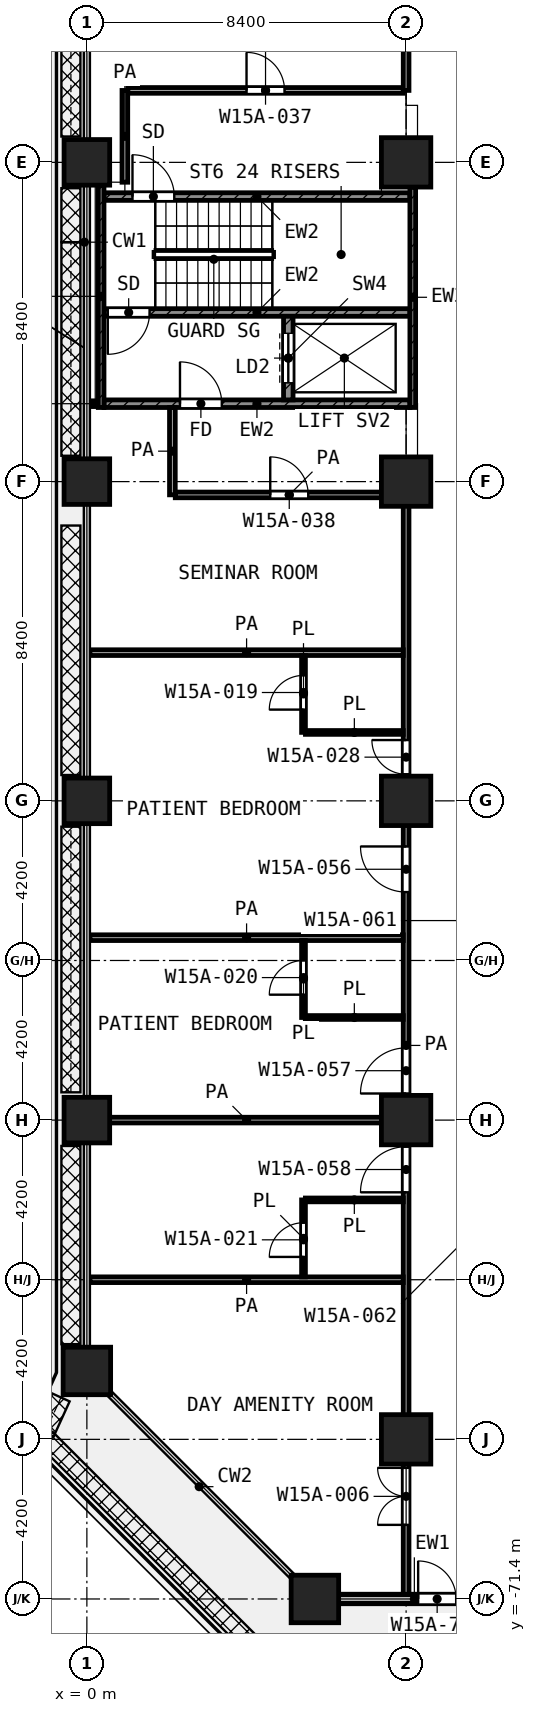
"""IFC4 building model, lengths in metres.
Left out: names, types, materials, properties, quantities, classifications, styles, units other than length and angle.
Written with IfcOpenShell. Run it as: python <this file> out.ifc"""

import sys

from ifc_helpers import new_model, si_unit, direction, frame, frame_2d, origin, origin_2d, place, context, subcontext, project, spatial, rectangle, extrude, element, fill, save


model = new_model("IFC4")
c1 = context("Model", 3, precision=1e-05, world=origin(), true_north=direction((0.0, 1.0)))
c2 = subcontext(c1, "Body", "Model", "MODEL_VIEW")
j1 = project(units=[si_unit("LENGTHUNIT", "METRE"), si_unit("PLANEANGLEUNIT", "RADIAN")], contexts=[c1])
p1 = place(None, origin())
s1 = spatial("IfcSite", under=j1, at=p1, CompositionType="ELEMENT")
p2 = place(p1, origin())
s2 = spatial("IfcBuilding", under=s1, at=p2, CompositionType="ELEMENT")
p3 = place(p2, frame((0.0, 0.0, 68.6)))
s3 = spatial("IfcBuildingStorey", under=s2, at=p3, CompositionType="ELEMENT", Elevation=68.6)
p4 = place(p3, frame((0.0, -33.6, 0.0), z_axis=(0.0, 0.0, 1.0), x_axis=(1.0, 0.0, 0.0)))
e1 = element("IfcColumn", 1, at=p4, inside=s3, PredefinedType="COLUMN", context=c2, shape_type="SweptSolid", body=[
    extrude(rectangle(XDim=1.2, YDim=1.2, at=origin_2d()), origin(), (0.0, 0.0, 1.0), 4.2),
])
p5 = place(p3, frame((8.4, -33.6, 0.0), z_axis=(0.0, 0.0, 1.0), x_axis=(1.0, 0.0, 0.0)))
e2 = element("IfcColumn", 2, at=p5, inside=s3, PredefinedType="COLUMN", context=c2, shape_type="SweptSolid", body=[
    extrude(rectangle(XDim=1.3, YDim=1.3, at=origin_2d()), origin(), (0.0, 0.0, 1.0), 4.2),
])
p6 = place(p3, frame((0.0, -42.0, 0.0), z_axis=(0.0, 0.0, 1.0), x_axis=(1.0, 0.0, 0.0)))
e3 = element("IfcColumn", 3, at=p6, inside=s3, PredefinedType="COLUMN", context=c2, shape_type="SweptSolid", body=[
    extrude(rectangle(XDim=1.2, YDim=1.2, at=origin_2d()), origin(), (0.0, 0.0, 1.0), 4.2),
])
p7 = place(p3, frame((8.4, -42.0, 0.0), z_axis=(0.0, 0.0, 1.0), x_axis=(1.0, 0.0, 0.0)))
e4 = element("IfcColumn", 4, at=p7, inside=s3, PredefinedType="COLUMN", context=c2, shape_type="SweptSolid", body=[
    extrude(rectangle(XDim=1.3, YDim=1.3, at=origin_2d()), origin(), (0.0, 0.0, 1.0), 4.2),
])
p8 = place(p3, frame((0.0, -50.4, 0.0), z_axis=(0.0, 0.0, 1.0), x_axis=(1.0, 0.0, 0.0)))
e5 = element("IfcColumn", 5, at=p8, inside=s3, PredefinedType="COLUMN", context=c2, shape_type="SweptSolid", body=[
    extrude(rectangle(XDim=1.2, YDim=1.2, at=origin_2d()), origin(), (0.0, 0.0, 1.0), 4.2),
])
p9 = place(p3, frame((8.4, -50.4, 0.0), z_axis=(0.0, 0.0, 1.0), x_axis=(1.0, 0.0, 0.0)))
e6 = element("IfcColumn", 6, at=p9, inside=s3, PredefinedType="COLUMN", context=c2, shape_type="SweptSolid", body=[
    extrude(rectangle(XDim=1.3, YDim=1.3, at=origin_2d()), origin(), (0.0, 0.0, 1.0), 4.2),
])
p10 = place(p3, frame((0.0, -58.8, 0.0), z_axis=(0.0, 0.0, 1.0), x_axis=(1.0, 0.0, 0.0)))
e7 = element("IfcColumn", 7, at=p10, inside=s3, PredefinedType="COLUMN", context=c2, shape_type="SweptSolid", body=[
    extrude(rectangle(XDim=1.2, YDim=1.2, at=origin_2d()), origin(), (0.0, 0.0, 1.0), 4.2),
])
p11 = place(p3, frame((8.4, -58.8, 0.0), z_axis=(0.0, 0.0, 1.0), x_axis=(1.0, 0.0, 0.0)))
e8 = element("IfcColumn", 8, at=p11, inside=s3, PredefinedType="COLUMN", context=c2, shape_type="SweptSolid", body=[
    extrude(rectangle(XDim=1.3, YDim=1.3, at=origin_2d()), origin(), (0.0, 0.0, 1.0), 4.2),
])
p12 = place(p3, frame((0.0, -65.4, 0.0), z_axis=(0.0, 0.0, 1.0), x_axis=(1.0, 0.0, 0.0)))
e9 = element("IfcColumn", 9, at=p12, inside=s3, PredefinedType="COLUMN", context=c2, shape_type="SweptSolid", body=[
    extrude(rectangle(XDim=1.25, YDim=1.25, at=origin_2d()), origin(), (0.0, 0.0, 1.0), 4.2),
])
p13 = place(p3, frame((8.4, -67.2, 0.0), z_axis=(0.0, 0.0, 1.0), x_axis=(1.0, 0.0, 0.0)))
e10 = element("IfcColumn", 10, at=p13, inside=s3, PredefinedType="COLUMN", context=c2, shape_type="SweptSolid", body=[
    extrude(rectangle(XDim=1.3, YDim=1.3, at=origin_2d()), origin(), (0.0, 0.0, 1.0), 4.2),
])
p14 = place(p3, frame((6.0, -71.4, 0.0), z_axis=(0.0, 0.0, 1.0), x_axis=(1.0, 0.0, 0.0)))
e11 = element("IfcColumn", 11, at=p14, inside=s3, PredefinedType="COLUMN", context=c2, shape_type="SweptSolid", body=[
    extrude(rectangle(XDim=1.25, YDim=1.25, at=origin_2d()), origin(), (0.0, 0.0, 1.0), 4.2),
])
p15 = place(p3, frame((6.625, -71.4, 0.0), z_axis=(0.0, 0.0, 1.0), x_axis=(1.0, 0.0, 0.0)))
e12 = element("IfcWall", 12, at=p15, inside=s3, PredefinedType="SOLIDWALL", context=c2, shape_type="SweptSolid", body=[
    extrude(rectangle(XDim=3.983, YDim=0.25, at=frame_2d((1.992, 0.0))), origin(), (0.0, 0.0, 1.0), 3.78),
])
p16 = place(p15, frame((2.092, 0.0, 0.0)))
e13 = element("IfcOpeningElement", 13, at=p16, cuts=e12, PredefinedType="OPENING", context=c2, shape_type="SweptSolid", body=[
    extrude(rectangle(XDim=1.0, YDim=2.1, at=frame_2d((0.5, 1.05))), frame((0.0, 0.135, 0.0), z_axis=(0.0, -1.0, 0.0), x_axis=(1.0, 0.0, 0.0)), (0.0, 0.0, 1.0), 0.27),
])
p17 = place(p3, frame((0.375, -40.05, 0.0), z_axis=(0.0, 0.0, 1.0), x_axis=(0.0, 1.0, 0.0)))
e14 = element("IfcWall", 14, at=p17, inside=s3, PredefinedType="SHEAR", context=c2, shape_type="SweptSolid", body=[
    extrude(rectangle(XDim=5.85, YDim=0.15, at=frame_2d((2.925, 0.0))), origin(), (0.0, 0.0, 1.0), 3.9),
])
p18 = place(p3, frame((8.575, -40.05, 0.0), z_axis=(0.0, 0.0, 1.0), x_axis=(0.0, 1.0, 0.0)))
e15 = element("IfcWall", 15, at=p18, inside=s3, PredefinedType="SHEAR", context=c2, shape_type="SweptSolid", body=[
    extrude(rectangle(XDim=5.8, YDim=0.15, at=frame_2d((2.9, 0.0))), origin(), (0.0, 0.0, 1.0), 3.9),
])
p19 = place(p3, frame((0.45, -34.5, 0.0), z_axis=(0.0, 0.0, 1.0), x_axis=(1.0, 0.0, 0.0)))
e16 = element("IfcWall", 16, at=p19, inside=s3, PredefinedType="SHEAR", context=c2, shape_type="SweptSolid", body=[
    extrude(rectangle(XDim=8.05, YDim=0.2, at=frame_2d((4.025, 0.0))), origin(), (0.0, 0.0, 1.0), 3.9),
])
p20 = place(p19, frame((0.75, 0.0, 0.0)))
e17 = element("IfcOpeningElement", 17, at=p20, cuts=e16, PredefinedType="OPENING", context=c2, shape_type="SweptSolid", body=[
    extrude(rectangle(XDim=1.1, YDim=2.1, at=frame_2d((0.55, 1.05))), frame((0.0, 0.11, 0.0), z_axis=(0.0, -1.0, 0.0), x_axis=(1.0, 0.0, 0.0)), (0.0, 0.0, 1.0), 0.22),
])
p21 = place(p3, frame((0.45, -37.55, 0.0), z_axis=(0.0, 0.0, 1.0), x_axis=(1.0, 0.0, 0.0)))
e18 = element("IfcWall", 18, at=p21, inside=s3, PredefinedType="SHEAR", context=c2, shape_type="SweptSolid", body=[
    extrude(rectangle(XDim=8.05, YDim=0.2, at=frame_2d((4.025, 0.0))), origin(), (0.0, 0.0, 1.0), 3.9),
])
p22 = place(p21, frame((0.1, 0.0, 0.0)))
e19 = element("IfcOpeningElement", 19, at=p22, cuts=e18, PredefinedType="OPENING", context=c2, shape_type="SweptSolid", body=[
    extrude(rectangle(XDim=1.1, YDim=2.1, at=frame_2d((0.55, 1.05))), frame((0.0, 0.11, 0.0), z_axis=(0.0, -1.0, 0.0), x_axis=(1.0, 0.0, 0.0)), (0.0, 0.0, 1.0), 0.22),
])
p23 = place(p3, frame((0.45, -39.95, 0.0), z_axis=(0.0, 0.0, 1.0), x_axis=(1.0, 0.0, 0.0)))
e20 = element("IfcWall", 20, at=p23, inside=s3, PredefinedType="SHEAR", context=c2, shape_type="SweptSolid", body=[
    extrude(rectangle(XDim=8.05, YDim=0.2, at=frame_2d((4.025, 0.0))), origin(), (0.0, 0.0, 1.0), 3.9),
])
p24 = place(p23, frame((2.0, 0.0, 0.0)))
e21 = element("IfcOpeningElement", 21, at=p24, cuts=e20, PredefinedType="OPENING", context=c2, shape_type="SweptSolid", body=[
    extrude(rectangle(XDim=1.1, YDim=2.1, at=frame_2d((0.55, 1.05))), frame((0.0, 0.11, 0.0), z_axis=(0.0, -1.0, 0.0), x_axis=(1.0, 0.0, 0.0)), (0.0, 0.0, 1.0), 0.22),
])
p25 = place(p3, frame((5.3, -39.85, 0.0), z_axis=(0.0, 0.0, 1.0), x_axis=(0.0, 1.0, 0.0)))
e22 = element("IfcWall", 22, at=p25, inside=s3, PredefinedType="SHEAR", context=c2, shape_type="SweptSolid", body=[
    extrude(rectangle(XDim=2.2, YDim=0.25, at=frame_2d((1.1, 0.0))), origin(), (0.0, 0.0, 1.0), 3.9),
])
p26 = place(p25, frame((0.45, 0.0, 0.0)))
e23 = element("IfcOpeningElement", 23, at=p26, cuts=e22, PredefinedType="OPENING", context=c2, shape_type="SweptSolid", body=[
    extrude(rectangle(XDim=1.3, YDim=2.1, at=frame_2d((0.65, 1.05))), frame((0.0, 0.135, 0.0), z_axis=(0.0, -1.0, 0.0), x_axis=(1.0, 0.0, 0.0)), (0.0, 0.0, 1.0), 0.27),
])
for number, where, z_axis, x_axis in (
    (24, (5.75, -60.9, 0.0), (0.0, 0.0, 1.0), (1.0, 0.0, 0.0)),
    (25, (5.75, -56.1, 0.0), (0.0, 0.0, 1.0), (1.0, 0.0, 0.0)),
):
    element("IfcWall", number, at=place(p3, frame(where, z_axis=z_axis, x_axis=x_axis)), inside=s3, PredefinedType="PARTITIONING", context=c2, shape_type="SweptSolid", body=[
        extrude(rectangle(XDim=2.575, YDim=0.1, at=frame_2d((1.288, 0.0))), origin(), (0.0, 0.0, 1.0), 3.9),
    ])
p27 = place(p3, frame((5.751, -48.6, 0.0), z_axis=(0.0, 0.0, 1.0), x_axis=(1.0, 0.0, 0.0)))
e26 = element("IfcWall", 26, at=p27, inside=s3, PredefinedType="PARTITIONING", context=c2, shape_type="SweptSolid", body=[
    extrude(rectangle(XDim=2.574, YDim=0.1, at=frame_2d((1.287, 0.0))), origin(), (0.0, 0.0, 1.0), 3.9),
])
p28 = place(p3, frame((5.7, -62.925, 0.0), z_axis=(0.0, 0.0, 1.0), x_axis=(0.0, 1.0, 0.0)))
e27 = element("IfcWall", 27, at=p28, inside=s3, PredefinedType="PARTITIONING", context=c2, shape_type="SweptSolid", body=[
    extrude(rectangle(XDim=2.025, YDim=0.1, at=frame_2d((1.013, 0.0))), origin(), (0.0, 0.0, 1.0), 3.9),
])
p29 = place(p28, frame((0.525, 0.0, 0.0)))
e28 = element("IfcOpeningElement", 28, at=p29, cuts=e27, PredefinedType="OPENING", context=c2, shape_type="SweptSolid", body=[
    extrude(rectangle(XDim=0.9, YDim=2.1, at=frame_2d((0.45, 1.05))), frame((0.0, 0.06, 0.0), z_axis=(0.0, -1.0, 0.0), x_axis=(1.0, 0.0, 0.0)), (0.0, 0.0, 1.0), 0.12),
])
p30 = place(p3, frame((5.7, -56.1, 0.0), z_axis=(0.0, 0.0, 1.0), x_axis=(0.0, 1.0, 0.0)))
e29 = element("IfcWall", 29, at=p30, inside=s3, PredefinedType="PARTITIONING", context=c2, shape_type="SweptSolid", body=[
    extrude(rectangle(XDim=2.025, YDim=0.1, at=frame_2d((1.013, 0.0))), origin(), (0.0, 0.0, 1.0), 3.9),
])
p31 = place(p30, frame((0.6, 0.0, 0.0)))
e30 = element("IfcOpeningElement", 30, at=p31, cuts=e29, PredefinedType="OPENING", context=c2, shape_type="SweptSolid", body=[
    extrude(rectangle(XDim=0.9, YDim=2.1, at=frame_2d((0.45, 1.05))), frame((0.0, 0.06, 0.0), z_axis=(0.0, -1.0, 0.0), x_axis=(1.0, 0.0, 0.0)), (0.0, 0.0, 1.0), 0.12),
])
p32 = place(p3, frame((5.7, -48.598, 0.0), z_axis=(0.0, 0.0, 1.0), x_axis=(0.0, 1.0, 0.0)))
e31 = element("IfcWall", 31, at=p32, inside=s3, PredefinedType="PARTITIONING", context=c2, shape_type="SweptSolid", body=[
    extrude(rectangle(XDim=2.023, YDim=0.1, at=frame_2d((1.011, 0.0))), origin(), (0.0, 0.0, 1.0), 3.9),
])
p33 = place(p32, frame((0.599, 0.0, 0.0)))
e32 = element("IfcOpeningElement", 32, at=p33, cuts=e31, PredefinedType="OPENING", context=c2, shape_type="SweptSolid", body=[
    extrude(rectangle(XDim=0.9, YDim=2.1, at=frame_2d((0.45, 1.05))), frame((0.0, 0.06, 0.0), z_axis=(0.0, -1.0, 0.0), x_axis=(1.0, 0.0, 0.0)), (0.0, 0.0, 1.0), 0.12),
])
for number, where, z_axis, x_axis in (
    (33, (0.08, -63.0, 0.0), (0.0, 0.0, 1.0), (1.0, 0.0, 0.0)),
    (34, (0.08, -58.8, 0.0), (0.0, 0.0, 1.0), (1.0, 0.0, 0.0)),
    (35, (0.08, -54.0, 0.0), (0.0, 0.0, 1.0), (1.0, 0.0, 0.0)),
    (36, (0.08, -46.5, 0.0), (0.0, 0.0, 1.0), (1.0, 0.0, 0.0)),
):
    element("IfcWall", number, at=place(p3, frame(where, z_axis=z_axis, x_axis=x_axis)), inside=s3, PredefinedType="PARTITIONING", context=c2, shape_type="SweptSolid", body=[
        extrude(rectangle(XDim=8.245, YDim=0.15, at=frame_2d((4.123, 0.0))), origin(), (0.0, 0.0, 1.0), 3.9),
    ])
p34 = place(p3, frame((2.326, -42.35, 0.0), z_axis=(0.0, 0.0, 1.0), x_axis=(1.0, 0.0, 0.0)))
e37 = element("IfcWall", 37, at=p34, inside=s3, PredefinedType="PARTITIONING", context=c2, shape_type="SweptSolid", body=[
    extrude(rectangle(XDim=5.999, YDim=0.15, at=frame_2d((3.0, 0.0))), origin(), (0.0, 0.0, 1.0), 3.9),
])
p35 = place(p34, frame((2.499, 0.0, 0.0)))
e38 = element("IfcOpeningElement", 38, at=p35, cuts=e37, PredefinedType="OPENING", context=c2, shape_type="SweptSolid", body=[
    extrude(rectangle(XDim=1.0, YDim=2.1, at=frame_2d((0.5, 1.05))), frame((0.0, 0.085, 0.0), z_axis=(0.0, -1.0, 0.0), x_axis=(1.0, 0.0, 0.0)), (0.0, 0.0, 1.0), 0.17),
])
p36 = place(p3, frame((0.08, -39.95, 0.0), z_axis=(0.0, 0.0, 1.0), x_axis=(1.0, 0.0, 0.0)))
e39 = element("IfcWall", 39, at=p36, inside=s3, PredefinedType="PARTITIONING", context=c2, shape_type="SweptSolid", body=[
    extrude(rectangle(XDim=0.19, YDim=0.15, at=frame_2d((0.095, 0.0))), origin(), (0.0, 0.0, 1.0), 3.9),
])
p37 = place(p3, frame((1.077, -31.707, 0.0), z_axis=(0.0, 0.0, 1.0), x_axis=(1.0, 0.0, 0.0)))
e40 = element("IfcWall", 40, at=p37, inside=s3, PredefinedType="PARTITIONING", context=c2, shape_type="SweptSolid", body=[
    extrude(rectangle(XDim=7.248, YDim=0.15, at=frame_2d((3.624, 0.0))), origin(), (0.0, 0.0, 1.0), 3.9),
])
p38 = place(p37, frame((3.124, 0.0, 0.0)))
e41 = element("IfcOpeningElement", 41, at=p38, cuts=e40, PredefinedType="OPENING", context=c2, shape_type="SweptSolid", body=[
    extrude(rectangle(XDim=1.0, YDim=2.1, at=frame_2d((0.5, 1.05))), frame((0.0, 0.085, 0.0), z_axis=(0.0, -1.0, 0.0), x_axis=(1.0, 0.0, 0.0)), (0.0, 0.0, 1.0), 0.17),
])
p39 = place(p3, frame((1.0, -34.123, 0.0), z_axis=(0.0, 0.0, 1.0), x_axis=(0.0, 1.0, 0.0)))
e42 = element("IfcWall", 42, at=p39, inside=s3, PredefinedType="PARTITIONING", context=c2, shape_type="SweptSolid", body=[
    extrude(rectangle(XDim=2.415, YDim=0.15, at=frame_2d((1.208, 0.0))), origin(), (0.0, 0.0, 1.0), 3.9),
])
p40 = place(p3, frame((2.25, -42.348, 0.0), z_axis=(0.0, 0.0, 1.0), x_axis=(0.0, 1.0, 0.0)))
e43 = element("IfcWall", 43, at=p40, inside=s3, PredefinedType="PARTITIONING", context=c2, shape_type="SweptSolid", body=[
    extrude(rectangle(XDim=2.298, YDim=0.15, at=frame_2d((1.149, 0.0))), origin(), (0.0, 0.0, 1.0), 3.9),
])
p41 = place(p3, frame((8.4, -71.32, 0.0), z_axis=(0.0, 0.0, 1.0), x_axis=(0.0, 1.0, 0.0)))
e44 = element("IfcWall", 44, at=p41, inside=s3, PredefinedType="PARTITIONING", context=c2, shape_type="SweptSolid", body=[
    extrude(rectangle(XDim=28.97, YDim=0.15, at=frame_2d((14.485, 0.0))), origin(), (0.0, 0.0, 1.0), 3.9),
])
p42 = place(p41, frame((18.52, 0.0, 0.0)))
e45 = element("IfcOpeningElement", 45, at=p42, cuts=e44, PredefinedType="OPENING", context=c2, shape_type="SweptSolid", body=[
    extrude(rectangle(XDim=1.2, YDim=2.1, at=frame_2d((0.6, 1.05))), frame((0.0, 0.085, 0.0), z_axis=(0.0, -1.0, 0.0), x_axis=(1.0, 0.0, 0.0)), (0.0, 0.0, 1.0), 0.17),
])
p43 = place(p41, frame((21.62, 0.0, 0.0)))
e46 = element("IfcOpeningElement", 46, at=p43, cuts=e44, PredefinedType="OPENING", context=c2, shape_type="SweptSolid", body=[
    extrude(rectangle(XDim=0.9, YDim=2.1, at=frame_2d((0.45, 1.05))), frame((0.0, 0.085, 0.0), z_axis=(0.0, -1.0, 0.0), x_axis=(1.0, 0.0, 0.0)), (0.0, 0.0, 1.0), 0.17),
])
p44 = place(p41, frame((13.22, 0.0, 0.0)))
e47 = element("IfcOpeningElement", 47, at=p44, cuts=e44, PredefinedType="OPENING", context=c2, shape_type="SweptSolid", body=[
    extrude(rectangle(XDim=1.2, YDim=2.1, at=frame_2d((0.6, 1.05))), frame((0.0, 0.085, 0.0), z_axis=(0.0, -1.0, 0.0), x_axis=(1.0, 0.0, 0.0)), (0.0, 0.0, 1.0), 0.17),
])
p45 = place(p41, frame((10.62, 0.0, 0.0)))
e48 = element("IfcOpeningElement", 48, at=p45, cuts=e44, PredefinedType="OPENING", context=c2, shape_type="SweptSolid", body=[
    extrude(rectangle(XDim=1.2, YDim=2.1, at=frame_2d((0.6, 1.05))), frame((0.0, 0.085, 0.0), z_axis=(0.0, -1.0, 0.0), x_axis=(1.0, 0.0, 0.0)), (0.0, 0.0, 1.0), 0.17),
])
p46 = place(p41, frame((1.87, 0.0, 0.0)))
e49 = element("IfcOpeningElement", 49, at=p46, cuts=e44, PredefinedType="OPENING", context=c2, shape_type="SweptSolid", body=[
    extrude(rectangle(XDim=1.5, YDim=2.1, at=frame_2d((0.75, 1.05))), frame((0.0, 0.085, 0.0), z_axis=(0.0, -1.0, 0.0), x_axis=(1.0, 0.0, 0.0)), (0.0, 0.0, 1.0), 0.17),
])
p47 = place(p3, frame((8.4, -31.707, 0.0), z_axis=(0.0, 0.0, 1.0), x_axis=(0.0, 1.0, 0.0)))
e50 = element("IfcWall", 50, at=p47, inside=s3, PredefinedType="PARTITIONING", context=c2, shape_type="SweptSolid", body=[
    extrude(rectangle(XDim=6.607, YDim=0.15, at=frame_2d((3.303, 0.0))), origin(), (0.0, 0.0, 1.0), 3.9),
])
p48 = place(p16, origin())
e51 = element("IfcDoor", 51, at=p48, inside=s3, OperationType="SINGLE_SWING_LEFT", PredefinedType="DOOR", context=c2, shape_type="SweptSolid", body=[
    extrude(rectangle(XDim=1.0, YDim=2.1, at=frame_2d((0.5, 1.05))), frame((0.0, 0.025, 0.0), z_axis=(0.0, -1.0, 0.0), x_axis=(1.0, 0.0, 0.0)), (0.0, 0.0, 1.0), 0.05),
])
fill(e13, e51)
p49 = place(p20, origin())
e52 = element("IfcDoor", 52, at=p49, inside=s3, OperationType="SINGLE_SWING_LEFT", PredefinedType="DOOR", context=c2, shape_type="SweptSolid", body=[
    extrude(rectangle(XDim=1.1, YDim=2.1, at=frame_2d((0.55, 1.05))), frame((0.0, 0.025, 0.0), z_axis=(0.0, -1.0, 0.0), x_axis=(1.0, 0.0, 0.0)), (0.0, 0.0, 1.0), 0.05),
])
fill(e17, e52)
p50 = place(p22, frame((1.1, 0.0, 0.0), z_axis=(0.0, 0.0, 1.0), x_axis=(-1.0, 0.0, 0.0)))
e53 = element("IfcDoor", 53, at=p50, inside=s3, OperationType="SINGLE_SWING_LEFT", PredefinedType="DOOR", context=c2, shape_type="SweptSolid", body=[
    extrude(rectangle(XDim=1.1, YDim=2.1, at=frame_2d((0.55, 1.05))), frame((0.0, 0.025, 0.0), z_axis=(0.0, -1.0, 0.0), x_axis=(1.0, 0.0, 0.0)), (0.0, 0.0, 1.0), 0.05),
])
fill(e19, e53)
p51 = place(p26, origin())
e54 = element("IfcDoor", 54, at=p51, inside=s3, OperationType="DOUBLE_DOOR_SLIDING", PredefinedType="DOOR", context=c2, shape_type="SweptSolid", body=[
    extrude(rectangle(XDim=1.3, YDim=2.1, at=frame_2d((0.65, 1.05))), frame((0.0, 0.025, 0.0), z_axis=(0.0, -1.0, 0.0), x_axis=(1.0, 0.0, 0.0)), (0.0, 0.0, 1.0), 0.05),
])
fill(e23, e54)
p52 = place(p24, origin())
e55 = element("IfcDoor", 55, at=p52, inside=s3, OperationType="SINGLE_SWING_LEFT", PredefinedType="DOOR", context=c2, shape_type="SweptSolid", body=[
    extrude(rectangle(XDim=1.1, YDim=2.1, at=frame_2d((0.55, 1.05))), frame((0.0, 0.025, 0.0), z_axis=(0.0, -1.0, 0.0), x_axis=(1.0, 0.0, 0.0)), (0.0, 0.0, 1.0), 0.05),
])
fill(e21, e55)
p53 = place(p38, origin())
e56 = element("IfcDoor", 56, at=p53, inside=s3, OperationType="SINGLE_SWING_LEFT", PredefinedType="DOOR", context=c2, shape_type="SweptSolid", body=[
    extrude(rectangle(XDim=1.0, YDim=2.1, at=frame_2d((0.5, 1.05))), frame((0.0, 0.025, 0.0), z_axis=(0.0, -1.0, 0.0), x_axis=(1.0, 0.0, 0.0)), (0.0, 0.0, 1.0), 0.05),
])
fill(e41, e56)
p54 = place(p35, origin())
e57 = element("IfcDoor", 57, at=p54, inside=s3, OperationType="SINGLE_SWING_LEFT", PredefinedType="DOOR", context=c2, shape_type="SweptSolid", body=[
    extrude(rectangle(XDim=1.0, YDim=2.1, at=frame_2d((0.5, 1.05))), frame((0.0, 0.025, 0.0), z_axis=(0.0, -1.0, 0.0), x_axis=(1.0, 0.0, 0.0)), (0.0, 0.0, 1.0), 0.05),
])
fill(e38, e57)
p55 = place(p42, origin())
e58 = element("IfcDoor", 58, at=p55, inside=s3, OperationType="SINGLE_SWING_RIGHT", PredefinedType="DOOR", context=c2, shape_type="SweptSolid", body=[
    extrude(rectangle(XDim=1.2, YDim=2.1, at=frame_2d((0.6, 1.05))), frame((0.0, 0.025, 0.0), z_axis=(0.0, -1.0, 0.0), x_axis=(1.0, 0.0, 0.0)), (0.0, 0.0, 1.0), 0.05),
])
fill(e45, e58)
p56 = place(p43, origin())
e59 = element("IfcDoor", 59, at=p56, inside=s3, OperationType="SINGLE_SWING_RIGHT", PredefinedType="DOOR", context=c2, shape_type="SweptSolid", body=[
    extrude(rectangle(XDim=0.9, YDim=2.1, at=frame_2d((0.45, 1.05))), frame((0.0, 0.025, 0.0), z_axis=(0.0, -1.0, 0.0), x_axis=(1.0, 0.0, 0.0)), (0.0, 0.0, 1.0), 0.05),
])
fill(e46, e59)
p57 = place(p33, origin())
e60 = element("IfcDoor", 60, at=p57, inside=s3, OperationType="SINGLE_SWING_LEFT", PredefinedType="DOOR", context=c2, shape_type="SweptSolid", body=[
    extrude(rectangle(XDim=0.9, YDim=2.1, at=frame_2d((0.45, 1.05))), frame((0.0, 0.025, 0.0), z_axis=(0.0, -1.0, 0.0), x_axis=(1.0, 0.0, 0.0)), (0.0, 0.0, 1.0), 0.05),
])
fill(e32, e60)
p58 = place(p44, origin())
e61 = element("IfcDoor", 61, at=p58, inside=s3, OperationType="SINGLE_SWING_LEFT", PredefinedType="DOOR", context=c2, shape_type="SweptSolid", body=[
    extrude(rectangle(XDim=1.2, YDim=2.1, at=frame_2d((0.6, 1.05))), frame((0.0, 0.025, 0.0), z_axis=(0.0, -1.0, 0.0), x_axis=(1.0, 0.0, 0.0)), (0.0, 0.0, 1.0), 0.05),
])
fill(e47, e61)
p59 = place(p31, origin())
e62 = element("IfcDoor", 62, at=p59, inside=s3, OperationType="SINGLE_SWING_LEFT", PredefinedType="DOOR", context=c2, shape_type="SweptSolid", body=[
    extrude(rectangle(XDim=0.9, YDim=2.1, at=frame_2d((0.45, 1.05))), frame((0.0, 0.025, 0.0), z_axis=(0.0, -1.0, 0.0), x_axis=(1.0, 0.0, 0.0)), (0.0, 0.0, 1.0), 0.05),
])
fill(e30, e62)
p60 = place(p45, origin())
e63 = element("IfcDoor", 63, at=p60, inside=s3, OperationType="SINGLE_SWING_LEFT", PredefinedType="DOOR", context=c2, shape_type="SweptSolid", body=[
    extrude(rectangle(XDim=1.2, YDim=2.1, at=frame_2d((0.6, 1.05))), frame((0.0, 0.025, 0.0), z_axis=(0.0, -1.0, 0.0), x_axis=(1.0, 0.0, 0.0)), (0.0, 0.0, 1.0), 0.05),
])
fill(e48, e63)
p61 = place(p29, origin())
e64 = element("IfcDoor", 64, at=p61, inside=s3, OperationType="SINGLE_SWING_LEFT", PredefinedType="DOOR", context=c2, shape_type="SweptSolid", body=[
    extrude(rectangle(XDim=0.9, YDim=2.1, at=frame_2d((0.45, 1.05))), frame((0.0, 0.025, 0.0), z_axis=(0.0, -1.0, 0.0), x_axis=(1.0, 0.0, 0.0)), (0.0, 0.0, 1.0), 0.05),
])
fill(e28, e64)
p62 = place(p46, origin())
e65 = element("IfcDoor", 65, at=p62, inside=s3, OperationType="DOUBLE_DOOR_SINGLE_SWING", PredefinedType="DOOR", context=c2, shape_type="SweptSolid", body=[
    extrude(rectangle(XDim=1.5, YDim=2.1, at=frame_2d((0.75, 1.05))), frame((0.0, 0.025, 0.0), z_axis=(0.0, -1.0, 0.0), x_axis=(1.0, 0.0, 0.0)), (0.0, 0.0, 1.0), 0.05),
])
fill(e49, e65)
save(model, sys.argv[1])
